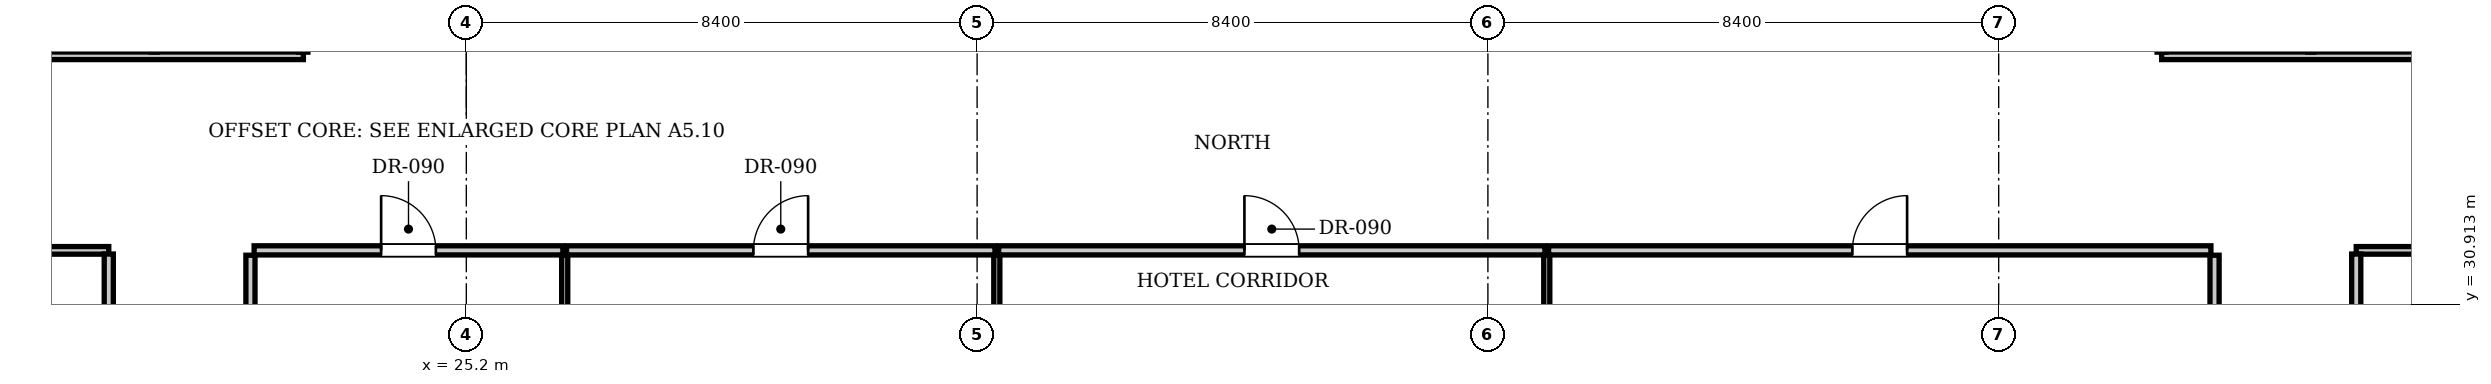
"""IFC4 building model, lengths in metres.
Left out: names, types, materials, properties, quantities, classifications, styles, units other than length and angle.
Written with IfcOpenShell. Run it as: python <this file> out.ifc"""

import sys

from ifc_helpers import new_model, si_unit, direction, frame, frame_2d, origin, place, context, subcontext, project, spatial, rectangle, extrude, element, fill, save


model = new_model("IFC4")
c1 = context("Model", 3, precision=1e-05, world=origin(), true_north=direction((0.0, 1.0)))
c2 = subcontext(c1, "Body", "Model", "MODEL_VIEW")
j1 = project(units=[si_unit("LENGTHUNIT", "METRE"), si_unit("PLANEANGLEUNIT", "RADIAN")], contexts=[c1])
p1 = place(None, origin())
s1 = spatial("IfcSite", under=j1, at=p1, CompositionType="ELEMENT")
p2 = place(p1, origin())
s2 = spatial("IfcBuilding", under=s1, at=p2, CompositionType="ELEMENT")
p3 = place(p2, frame((0.0, 0.0, 34.65)))
s3 = spatial("IfcBuildingStorey", under=s2, at=p3, CompositionType="ELEMENT", Elevation=34.65)
for number, where, z_axis, x_axis in (
    (1, (21.65, 23.48, 0.0), (0.0, 0.0, 1.0), (0.0, 1.0, 0.0)),
    (2, (53.95, 23.48, 0.0), (0.0, 0.0, 1.0), (0.0, 1.0, 0.0)),
):
    element("IfcWall", number, at=place(p3, frame(where, z_axis=z_axis, x_axis=x_axis)), inside=s3, PredefinedType="PARTITIONING", context=c2, shape_type="SweptSolid", body=[
        extrude(rectangle(XDim=8.24, YDim=0.15, at=frame_2d((4.12, 0.0))), origin(), (0.0, 0.0, 1.0), 3.61),
    ])
p4 = place(p3, frame((21.71, 31.8, 0.0), z_axis=(0.0, 0.0, 1.0), x_axis=(1.0, 0.0, 0.0)))
e3 = element("IfcWall", 3, at=p4, inside=s3, PredefinedType="PARTITIONING", context=c2, shape_type="SweptSolid", body=[
    extrude(rectangle(XDim=5.078, YDim=0.15, at=frame_2d((2.539, 0.0))), origin(), (0.0, 0.0, 1.0), 3.61),
])
p5 = place(p4, frame((2.089, 0.0, 0.0)))
e4 = element("IfcOpeningElement", 4, at=p5, cuts=e3, PredefinedType="OPENING", context=c2, shape_type="SweptSolid", body=[
    extrude(rectangle(XDim=0.9, YDim=2.1, at=frame_2d((0.45, 1.05))), frame((0.0, 0.085, 0.0), z_axis=(0.0, -1.0, 0.0), x_axis=(1.0, 0.0, 0.0)), (0.0, 0.0, 1.0), 0.17),
])
p6 = place(p3, frame((26.818, 23.48, 0.0), z_axis=(0.0, 0.0, 1.0), x_axis=(0.0, 1.0, 0.0)))
e5 = element("IfcWall", 5, at=p6, inside=s3, PredefinedType="PARTITIONING", context=c2, shape_type="SweptSolid", body=[
    extrude(rectangle(XDim=8.24, YDim=0.1, at=frame_2d((4.12, 0.0))), origin(), (0.0, 0.0, 1.0), 3.61),
])
p7 = place(p3, frame((26.848, 31.8, 0.0), z_axis=(0.0, 0.0, 1.0), x_axis=(1.0, 0.0, 0.0)))
e6 = element("IfcWall", 6, at=p7, inside=s3, PredefinedType="PARTITIONING", context=c2, shape_type="SweptSolid", body=[
    extrude(rectangle(XDim=7.046, YDim=0.15, at=frame_2d((3.523, 0.0))), origin(), (0.0, 0.0, 1.0), 3.61),
])
p8 = place(p7, frame((3.073, 0.0, 0.0)))
e7 = element("IfcOpeningElement", 7, at=p8, cuts=e6, PredefinedType="OPENING", context=c2, shape_type="SweptSolid", body=[
    extrude(rectangle(XDim=0.9, YDim=2.1, at=frame_2d((0.45, 1.05))), frame((0.0, 0.085, 0.0), z_axis=(0.0, -1.0, 0.0), x_axis=(1.0, 0.0, 0.0)), (0.0, 0.0, 1.0), 0.17),
])
p9 = place(p3, frame((33.924, 23.48, 0.0), z_axis=(0.0, 0.0, 1.0), x_axis=(0.0, 1.0, 0.0)))
e8 = element("IfcWall", 8, at=p9, inside=s3, PredefinedType="PARTITIONING", context=c2, shape_type="SweptSolid", body=[
    extrude(rectangle(XDim=8.24, YDim=0.1, at=frame_2d((4.12, 0.0))), origin(), (0.0, 0.0, 1.0), 3.61),
])
p10 = place(p3, frame((33.954, 31.8, 0.0), z_axis=(0.0, 0.0, 1.0), x_axis=(1.0, 0.0, 0.0)))
e9 = element("IfcWall", 9, at=p10, inside=s3, PredefinedType="PARTITIONING", context=c2, shape_type="SweptSolid", body=[
    extrude(rectangle(XDim=8.984, YDim=0.15, at=frame_2d((4.492, 0.0))), origin(), (0.0, 0.0, 1.0), 3.61),
])
p11 = place(p10, frame((4.042, 0.0, 0.0)))
e10 = element("IfcOpeningElement", 10, at=p11, cuts=e9, PredefinedType="OPENING", context=c2, shape_type="SweptSolid", body=[
    extrude(rectangle(XDim=0.9, YDim=2.1, at=frame_2d((0.45, 1.05))), frame((0.0, 0.085, 0.0), z_axis=(0.0, -1.0, 0.0), x_axis=(1.0, 0.0, 0.0)), (0.0, 0.0, 1.0), 0.17),
])
p12 = place(p3, frame((42.968, 23.48, 0.0), z_axis=(0.0, 0.0, 1.0), x_axis=(0.0, 1.0, 0.0)))
e11 = element("IfcWall", 11, at=p12, inside=s3, PredefinedType="PARTITIONING", context=c2, shape_type="SweptSolid", body=[
    extrude(rectangle(XDim=8.24, YDim=0.1, at=frame_2d((4.12, 0.0))), origin(), (0.0, 0.0, 1.0), 3.61),
])
p13 = place(p3, frame((42.998, 31.8, 0.0), z_axis=(0.0, 0.0, 1.0), x_axis=(1.0, 0.0, 0.0)))
e12 = element("IfcWall", 12, at=p13, inside=s3, PredefinedType="PARTITIONING", context=c2, shape_type="SweptSolid", body=[
    extrude(rectangle(XDim=10.892, YDim=0.15, at=frame_2d((5.446, 0.0))), origin(), (0.0, 0.0, 1.0), 3.61),
])
p14 = place(p13, frame((4.996, 0.0, 0.0)))
e13 = element("IfcOpeningElement", 13, at=p14, cuts=e12, PredefinedType="OPENING", context=c2, shape_type="SweptSolid", body=[
    extrude(rectangle(XDim=0.9, YDim=2.1, at=frame_2d((0.45, 1.05))), frame((0.0, 0.085, 0.0), z_axis=(0.0, -1.0, 0.0), x_axis=(1.0, 0.0, 0.0)), (0.0, 0.0, 1.0), 0.17),
])
p15 = place(p3, frame((10.9, 31.8, 0.0), z_axis=(0.0, 0.0, 1.0), x_axis=(1.0, 0.0, 0.0)))
e14 = element("IfcWall", 14, at=p15, inside=s3, PredefinedType="PARTITIONING", context=c2, shape_type="SweptSolid", body=[
    extrude(rectangle(XDim=8.42, YDim=0.125, at=frame_2d((4.21, 0.0))), origin(), (0.0, 0.0, 1.0), 3.61),
])
p16 = place(p3, frame((56.28, 31.8, 0.0), z_axis=(0.0, 0.0, 1.0), x_axis=(1.0, 0.0, 0.0)))
e15 = element("IfcWall", 15, at=p16, inside=s3, PredefinedType="PARTITIONING", context=c2, shape_type="SweptSolid", body=[
    extrude(rectangle(XDim=8.42, YDim=0.125, at=frame_2d((4.21, 0.0))), origin(), (0.0, 0.0, 1.0), 3.61),
])
for number, where, z_axis, x_axis in (
    (16, (19.32, 29.85, 0.0), (0.0, 0.0, 1.0), (0.0, 1.0, 0.0)),
    (17, (56.28, 29.85, 0.0), (0.0, 0.0, 1.0), (0.0, 1.0, 0.0)),
):
    element("IfcWall", number, at=place(p3, frame(where, z_axis=z_axis, x_axis=x_axis)), inside=s3, PredefinedType="PARTITIONING", context=c2, shape_type="SweptSolid", body=[
        extrude(rectangle(XDim=1.89, YDim=0.15, at=frame_2d((0.945, 0.0))), origin(), (0.0, 0.0, 1.0), 3.61),
    ])
p17 = place(p3, frame((10.9, 35.0, 0.0), z_axis=(0.0, 0.0, 1.0), x_axis=(1.0, 0.0, 0.0)))
e18 = element("IfcWall", 18, at=p17, inside=s3, PredefinedType="PARTITIONING", context=c2, shape_type="SweptSolid", body=[
    extrude(rectangle(XDim=11.62, YDim=0.125, at=frame_2d((5.81, 0.0))), origin(), (0.0, 0.0, 1.0), 3.61),
])
p18 = place(p3, frame((53.08, 35.0, 0.0), z_axis=(0.0, 0.0, 1.0), x_axis=(1.0, 0.0, 0.0)))
e19 = element("IfcWall", 19, at=p18, inside=s3, PredefinedType="PARTITIONING", context=c2, shape_type="SweptSolid", body=[
    extrude(rectangle(XDim=11.62, YDim=0.125, at=frame_2d((5.81, 0.0))), origin(), (0.0, 0.0, 1.0), 3.61),
])
p19 = place(p5, origin())
e20 = element("IfcDoor", 20, at=p19, inside=s3, OperationType="SINGLE_SWING_LEFT", PredefinedType="DOOR", context=c2, shape_type="SweptSolid", body=[
    extrude(rectangle(XDim=0.9, YDim=2.1, at=frame_2d((0.45, 1.05))), frame((0.0, 0.025, 0.0), z_axis=(0.0, -1.0, 0.0), x_axis=(1.0, 0.0, 0.0)), (0.0, 0.0, 1.0), 0.05),
])
fill(e4, e20)
p20 = place(p8, origin())
e21 = element("IfcDoor", 21, at=p20, inside=s3, OperationType="SINGLE_SWING_RIGHT", PredefinedType="DOOR", context=c2, shape_type="SweptSolid", body=[
    extrude(rectangle(XDim=0.9, YDim=2.1, at=frame_2d((0.45, 1.05))), frame((0.0, 0.025, 0.0), z_axis=(0.0, -1.0, 0.0), x_axis=(1.0, 0.0, 0.0)), (0.0, 0.0, 1.0), 0.05),
])
fill(e7, e21)
p21 = place(p11, origin())
e22 = element("IfcDoor", 22, at=p21, inside=s3, OperationType="SINGLE_SWING_LEFT", PredefinedType="DOOR", context=c2, shape_type="SweptSolid", body=[
    extrude(rectangle(XDim=0.9, YDim=2.1, at=frame_2d((0.45, 1.05))), frame((0.0, 0.025, 0.0), z_axis=(0.0, -1.0, 0.0), x_axis=(1.0, 0.0, 0.0)), (0.0, 0.0, 1.0), 0.05),
])
fill(e10, e22)
p22 = place(p14, origin())
e23 = element("IfcDoor", 23, at=p22, inside=s3, OperationType="SINGLE_SWING_RIGHT", PredefinedType="DOOR", context=c2, shape_type="SweptSolid", body=[
    extrude(rectangle(XDim=0.9, YDim=2.1, at=frame_2d((0.45, 1.05))), frame((0.0, 0.025, 0.0), z_axis=(0.0, -1.0, 0.0), x_axis=(1.0, 0.0, 0.0)), (0.0, 0.0, 1.0), 0.05),
])
fill(e13, e23)
save(model, sys.argv[1])
